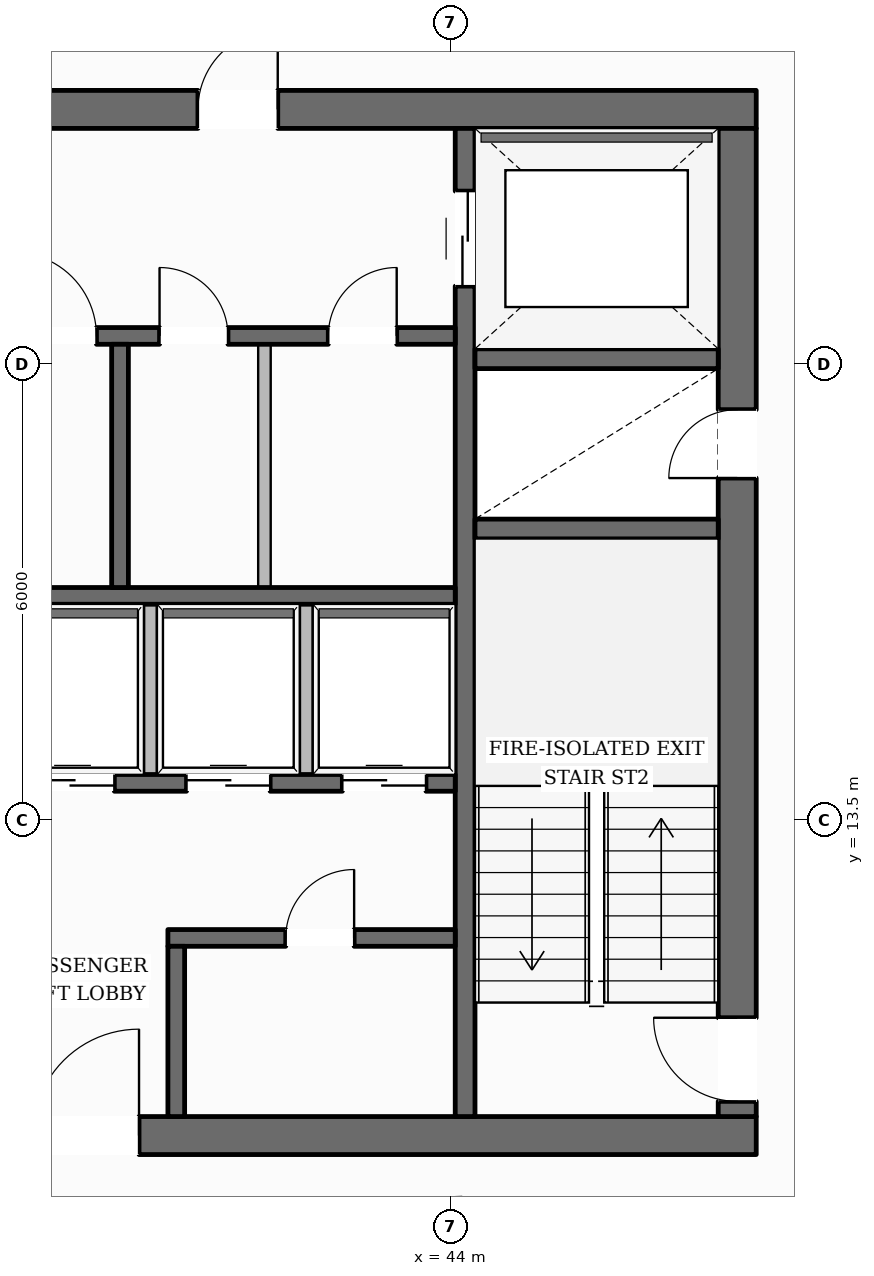
"""IFC4 building model, lengths in metres.
Left out: names, types, materials, properties, quantities, classifications, styles, units other than length and angle.
Written with IfcOpenShell. Run it as: python <this file> out.ifc"""

import sys

from ifc_helpers import new_model, si_unit, direction, frame, frame_2d, origin, place, context, subcontext, project, spatial, rectangle, extrude, element, fill, save


model = new_model("IFC4")
c1 = context("Model", 3, precision=1e-05, world=origin(), true_north=direction((0.0, 1.0)))
c2 = subcontext(c1, "Body", "Model", "MODEL_VIEW")
j1 = project(units=[si_unit("LENGTHUNIT", "METRE"), si_unit("PLANEANGLEUNIT", "RADIAN")], contexts=[c1])
p1 = place(None, origin())
s1 = spatial("IfcSite", under=j1, at=p1, CompositionType="ELEMENT")
p2 = place(p1, origin())
s2 = spatial("IfcBuilding", under=s1, at=p2, CompositionType="ELEMENT")
p3 = place(p2, frame((0.0, 0.0, 100.9)))
s3 = spatial("IfcBuildingStorey", under=s2, at=p3, CompositionType="ELEMENT", Elevation=100.9)
p4 = place(p3, frame((27.98, 9.35, 0.0), z_axis=(0.0, 0.0, 1.0), x_axis=(1.0, 0.0, 0.0)))
e1 = element("IfcWall", 1, at=p4, inside=s3, PredefinedType="SOLIDWALL", context=c2, shape_type="SweptSolid", body=[
    extrude(rectangle(XDim=20.04, YDim=0.5, at=frame_2d((10.02, 0.0))), origin(), (0.0, 0.0, 1.0), 3.6),
])
p5 = place(p4, frame((10.52, 0.0, 0.0)))
e2 = element("IfcOpeningElement", 2, at=p5, cuts=e1, PredefinedType="OPENING", context=c2, shape_type="SweptSolid", body=[
    extrude(rectangle(XDim=1.4, YDim=2.2, at=frame_2d((0.7, 1.1))), frame((0.0, 0.26, 0.0), z_axis=(0.0, -1.0, 0.0), x_axis=(1.0, 0.0, 0.0)), (0.0, 0.0, 1.0), 0.52),
])
p6 = place(p3, frame((27.98, 22.85, 0.0), z_axis=(0.0, 0.0, 1.0), x_axis=(1.0, 0.0, 0.0)))
e3 = element("IfcWall", 3, at=p6, inside=s3, PredefinedType="SOLIDWALL", context=c2, shape_type="SweptSolid", body=[
    extrude(rectangle(XDim=20.04, YDim=0.5, at=frame_2d((10.02, 0.0))), origin(), (0.0, 0.0, 1.0), 3.6),
])
p7 = place(p6, frame((6.295, 0.0, 0.0)))
e4 = element("IfcOpeningElement", 4, at=p7, cuts=e3, PredefinedType="OPENING", context=c2, shape_type="SweptSolid", body=[
    extrude(rectangle(XDim=1.05, YDim=2.15, at=frame_2d((0.525, 1.075))), frame((0.0, 0.26, 0.0), z_axis=(0.0, -1.0, 0.0), x_axis=(1.0, 0.0, 0.0)), (0.0, 0.0, 1.0), 0.52),
])
p8 = place(p6, frame((12.695, 0.0, 0.0)))
e5 = element("IfcOpeningElement", 5, at=p8, cuts=e3, PredefinedType="OPENING", context=c2, shape_type="SweptSolid", body=[
    extrude(rectangle(XDim=1.05, YDim=2.15, at=frame_2d((0.525, 1.075))), frame((0.0, 0.26, 0.0), z_axis=(0.0, -1.0, 0.0), x_axis=(1.0, 0.0, 0.0)), (0.0, 0.0, 1.0), 0.52),
])
p9 = place(p3, frame((47.77, 9.6, 0.0), z_axis=(0.0, 0.0, 1.0), x_axis=(0.0, 1.0, 0.0)))
e6 = element("IfcWall", 6, at=p9, inside=s3, PredefinedType="SOLIDWALL", context=c2, shape_type="SweptSolid", body=[
    extrude(rectangle(XDim=13.0, YDim=0.5, at=frame_2d((6.5, 0.0))), origin(), (0.0, 0.0, 1.0), 3.6),
])
p10 = place(p9, frame((0.2, 0.0, 0.0)))
e7 = element("IfcOpeningElement", 7, at=p10, cuts=e6, PredefinedType="OPENING", context=c2, shape_type="SweptSolid", body=[
    extrude(rectangle(XDim=1.1, YDim=2.15, at=frame_2d((0.55, 1.075))), frame((0.0, 0.26, 0.0), z_axis=(0.0, -1.0, 0.0), x_axis=(1.0, 0.0, 0.0)), (0.0, 0.0, 1.0), 0.52),
])
p11 = place(p9, frame((8.4, 0.0, 0.0)))
e8 = element("IfcOpeningElement", 8, at=p11, cuts=e6, PredefinedType="OPENING", context=c2, shape_type="SweptSolid", body=[
    extrude(rectangle(XDim=0.9, YDim=2.1, at=frame_2d((0.45, 1.05))), frame((0.0, 0.26, 0.0), z_axis=(0.0, -1.0, 0.0), x_axis=(1.0, 0.0, 0.0)), (0.0, 0.0, 1.0), 0.52),
])
p12 = place(p3, frame((44.19, 9.6, 0.0), z_axis=(0.0, 0.0, 1.0), x_axis=(0.0, 1.0, 0.0)))
e9 = element("IfcWall", 9, at=p12, inside=s3, PredefinedType="SHEAR", context=c2, shape_type="SweptSolid", body=[
    extrude(rectangle(XDim=13.0, YDim=0.26, at=frame_2d((6.5, 0.0))), origin(), (0.0, 0.0, 1.0), 3.6),
])
p13 = place(p12, frame((10.925, 0.0, 0.0)))
e10 = element("IfcOpeningElement", 10, at=p13, cuts=e9, PredefinedType="OPENING", context=c2, shape_type="SweptSolid", body=[
    extrude(rectangle(XDim=1.25, YDim=2.25, at=frame_2d((0.625, 1.125))), frame((0.0, 0.14, 0.0), z_axis=(0.0, -1.0, 0.0), x_axis=(1.0, 0.0, 0.0)), (0.0, 0.0, 1.0), 0.28),
])
for number, where, z_axis, x_axis in (
    (11, (44.32, 17.33, 0.0), (0.0, 0.0, 1.0), (1.0, 0.0, 0.0)),
    (12, (44.32, 19.57, 0.0), (0.0, 0.0, 1.0), (1.0, 0.0, 0.0)),
):
    element("IfcWall", number, at=place(p3, frame(where, z_axis=z_axis, x_axis=x_axis)), inside=s3, PredefinedType="SHEAR", context=c2, shape_type="SweptSolid", body=[
        extrude(rectangle(XDim=3.2, YDim=0.26, at=frame_2d((1.6, 0.0))), origin(), (0.0, 0.0, 1.0), 3.6),
    ])
p14 = place(p3, frame((31.94, 19.87, 0.0), z_axis=(0.0, 0.0, 1.0), x_axis=(1.0, 0.0, 0.0)))
e13 = element("IfcWall", 13, at=p14, inside=s3, PredefinedType="SOLIDWALL", context=c2, shape_type="SweptSolid", body=[
    extrude(rectangle(XDim=12.12, YDim=0.22, at=frame_2d((6.06, 0.0))), origin(), (0.0, 0.0, 1.0), 3.6),
])
p15 = place(p14, frame((6.3, 0.0, 0.0)))
e14 = element("IfcOpeningElement", 14, at=p15, cuts=e13, PredefinedType="OPENING", context=c2, shape_type="SweptSolid", body=[
    extrude(rectangle(XDim=1.1, YDim=2.15, at=frame_2d((0.55, 1.075))), frame((0.0, 0.12, 0.0), z_axis=(0.0, -1.0, 0.0), x_axis=(1.0, 0.0, 0.0)), (0.0, 0.0, 1.0), 0.24),
])
p16 = place(p14, frame((8.23, 0.0, 0.0)))
e15 = element("IfcOpeningElement", 15, at=p16, cuts=e13, PredefinedType="OPENING", context=c2, shape_type="SweptSolid", body=[
    extrude(rectangle(XDim=0.9, YDim=2.1, at=frame_2d((0.45, 1.05))), frame((0.0, 0.12, 0.0), z_axis=(0.0, -1.0, 0.0), x_axis=(1.0, 0.0, 0.0)), (0.0, 0.0, 1.0), 0.24),
])
p17 = place(p14, frame((10.45, 0.0, 0.0)))
e16 = element("IfcOpeningElement", 16, at=p17, cuts=e13, PredefinedType="OPENING", context=c2, shape_type="SweptSolid", body=[
    extrude(rectangle(XDim=0.9, YDim=2.1, at=frame_2d((0.45, 1.05))), frame((0.0, 0.12, 0.0), z_axis=(0.0, -1.0, 0.0), x_axis=(1.0, 0.0, 0.0)), (0.0, 0.0, 1.0), 0.24),
])
p18 = place(p3, frame((31.94, 16.45, 0.0), z_axis=(0.0, 0.0, 1.0), x_axis=(1.0, 0.0, 0.0)))
e17 = element("IfcWall", 17, at=p18, inside=s3, PredefinedType="SOLIDWALL", context=c2, shape_type="SweptSolid", body=[
    extrude(rectangle(XDim=12.12, YDim=0.22, at=frame_2d((6.06, 0.0))), origin(), (0.0, 0.0, 1.0), 3.6),
])
p19 = place(p3, frame((39.65, 16.56, 0.0), z_axis=(0.0, 0.0, 1.0), x_axis=(0.0, 1.0, 0.0)))
e18 = element("IfcWall", 18, at=p19, inside=s3, PredefinedType="SOLIDWALL", context=c2, shape_type="SweptSolid", body=[
    extrude(rectangle(XDim=3.2, YDim=0.22, at=frame_2d((1.6, 0.0))), origin(), (0.0, 0.0, 1.0), 3.6),
])
p20 = place(p3, frame((31.94, 13.99, 0.0), z_axis=(0.0, 0.0, 1.0), x_axis=(1.0, 0.0, 0.0)))
e19 = element("IfcWall", 19, at=p20, inside=s3, PredefinedType="SOLIDWALL", context=c2, shape_type="SweptSolid", body=[
    extrude(rectangle(XDim=12.12, YDim=0.22, at=frame_2d((6.06, 0.0))), origin(), (0.0, 0.0, 1.0), 3.6),
])
p21 = place(p20, frame((1.21, 0.0, 0.0)))
e20 = element("IfcOpeningElement", 20, at=p21, cuts=e19, PredefinedType="OPENING", context=c2, shape_type="SweptSolid", body=[
    extrude(rectangle(XDim=0.9, YDim=2.1, at=frame_2d((0.45, 1.05))), frame((0.0, 0.12, 0.0), z_axis=(0.0, -1.0, 0.0), x_axis=(1.0, 0.0, 0.0)), (0.0, 0.0, 1.0), 0.24),
])
p22 = place(p20, frame((4.31, 0.0, 0.0)))
e21 = element("IfcOpeningElement", 21, at=p22, cuts=e19, PredefinedType="OPENING", context=c2, shape_type="SweptSolid", body=[
    extrude(rectangle(XDim=0.9, YDim=2.1, at=frame_2d((0.45, 1.05))), frame((0.0, 0.12, 0.0), z_axis=(0.0, -1.0, 0.0), x_axis=(1.0, 0.0, 0.0)), (0.0, 0.0, 1.0), 0.24),
])
p23 = place(p20, frame((6.535, 0.0, 0.0)))
e22 = element("IfcOpeningElement", 22, at=p23, cuts=e19, PredefinedType="OPENING", context=c2, shape_type="SweptSolid", body=[
    extrude(rectangle(XDim=1.1, YDim=2.2, at=frame_2d((0.55, 1.1))), frame((0.0, 0.12, 0.0), z_axis=(0.0, -1.0, 0.0), x_axis=(1.0, 0.0, 0.0)), (0.0, 0.0, 1.0), 0.24),
])
p24 = place(p20, frame((8.585, 0.0, 0.0)))
e23 = element("IfcOpeningElement", 23, at=p24, cuts=e19, PredefinedType="OPENING", context=c2, shape_type="SweptSolid", body=[
    extrude(rectangle(XDim=1.1, YDim=2.2, at=frame_2d((0.55, 1.1))), frame((0.0, 0.12, 0.0), z_axis=(0.0, -1.0, 0.0), x_axis=(1.0, 0.0, 0.0)), (0.0, 0.0, 1.0), 0.24),
])
p25 = place(p20, frame((10.635, 0.0, 0.0)))
e24 = element("IfcOpeningElement", 24, at=p25, cuts=e19, PredefinedType="OPENING", context=c2, shape_type="SweptSolid", body=[
    extrude(rectangle(XDim=1.1, YDim=2.2, at=frame_2d((0.55, 1.1))), frame((0.0, 0.12, 0.0), z_axis=(0.0, -1.0, 0.0), x_axis=(1.0, 0.0, 0.0)), (0.0, 0.0, 1.0), 0.24),
])
p26 = place(p3, frame((40.28, 11.95, 0.0), z_axis=(0.0, 0.0, 1.0), x_axis=(1.0, 0.0, 0.0)))
e25 = element("IfcWall", 25, at=p26, inside=s3, PredefinedType="SOLIDWALL", context=c2, shape_type="SweptSolid", body=[
    extrude(rectangle(XDim=3.78, YDim=0.22, at=frame_2d((1.89, 0.0))), origin(), (0.0, 0.0, 1.0), 3.6),
])
p27 = place(p26, frame((1.55, 0.0, 0.0)))
e26 = element("IfcOpeningElement", 26, at=p27, cuts=e25, PredefinedType="OPENING", context=c2, shape_type="SweptSolid", body=[
    extrude(rectangle(XDim=0.9, YDim=2.1, at=frame_2d((0.45, 1.05))), frame((0.0, 0.12, 0.0), z_axis=(0.0, -1.0, 0.0), x_axis=(1.0, 0.0, 0.0)), (0.0, 0.0, 1.0), 0.24),
])
p28 = place(p3, frame((40.39, 9.6, 0.0), z_axis=(0.0, 0.0, 1.0), x_axis=(0.0, 1.0, 0.0)))
e27 = element("IfcWall", 27, at=p28, inside=s3, PredefinedType="SOLIDWALL", context=c2, shape_type="SweptSolid", body=[
    extrude(rectangle(XDim=2.24, YDim=0.22, at=frame_2d((1.12, 0.0))), origin(), (0.0, 0.0, 1.0), 3.6),
])
p29 = place(p3, frame((44.12, 44.689, 0.0), z_axis=(0.0, 0.0, 1.0), x_axis=(0.498376840975, -0.866960509124, 0.0)))
e28 = element("IfcWall", 28, at=p29, inside=s3, PredefinedType="STANDARD", context=c2, shape_type="SweptSolid", body=[
    extrude(rectangle(XDim=36.441, YDim=0.38, at=frame_2d((18.22, 0.0))), origin(), (0.0, 0.0, 1.0), 3.059),
])
p30 = place(p29, frame((32.234, 0.0, 0.65)))
e29 = element("IfcOpeningElement", 29, at=p30, cuts=e28, PredefinedType="OPENING", context=c2, shape_type="SweptSolid", body=[
    extrude(rectangle(XDim=1.55, YDim=1.75, at=frame_2d((0.775, 0.875))), frame((0.0, 0.2, 0.0), z_axis=(0.0, -1.0, 0.0), x_axis=(1.0, 0.0, 0.0)), (0.0, 0.0, 1.0), 0.4),
])
p31 = place(p29, frame((26.319, 0.0, 0.65)))
e30 = element("IfcOpeningElement", 30, at=p31, cuts=e28, PredefinedType="OPENING", context=c2, shape_type="SweptSolid", body=[
    extrude(rectangle(XDim=1.55, YDim=1.75, at=frame_2d((0.775, 0.875))), frame((0.0, 0.2, 0.0), z_axis=(0.0, -1.0, 0.0), x_axis=(1.0, 0.0, 0.0)), (0.0, 0.0, 1.0), 0.4),
])
p32 = place(p29, frame((14.489, 0.0, 0.65)))
e31 = element("IfcOpeningElement", 31, at=p32, cuts=e28, PredefinedType="OPENING", context=c2, shape_type="SweptSolid", body=[
    extrude(rectangle(XDim=1.55, YDim=1.75, at=frame_2d((0.775, 0.875))), frame((0.0, 0.2, 0.0), z_axis=(0.0, -1.0, 0.0), x_axis=(1.0, 0.0, 0.0)), (0.0, 0.0, 1.0), 0.4),
])
p33 = place(p29, frame((8.573, 0.0, 0.65)))
e32 = element("IfcOpeningElement", 32, at=p33, cuts=e28, PredefinedType="OPENING", context=c2, shape_type="SweptSolid", body=[
    extrude(rectangle(XDim=1.55, YDim=1.75, at=frame_2d((0.775, 0.875))), frame((0.0, 0.2, 0.0), z_axis=(0.0, -1.0, 0.0), x_axis=(1.0, 0.0, 0.0)), (0.0, 0.0, 1.0), 0.4),
])
p34 = place(p29, frame((2.658, 0.0, 0.65)))
e33 = element("IfcOpeningElement", 33, at=p34, cuts=e28, PredefinedType="OPENING", context=c2, shape_type="SweptSolid", body=[
    extrude(rectangle(XDim=1.55, YDim=1.75, at=frame_2d((0.775, 0.875))), frame((0.0, 0.2, 0.0), z_axis=(0.0, -1.0, 0.0), x_axis=(1.0, 0.0, 0.0)), (0.0, 0.0, 1.0), 0.4),
])
for number, where, z_axis, x_axis in (
    (34, (40.05, 14.1, 0.0), (0.0, 0.0, 1.0), (0.0, 1.0, 0.0)),
    (35, (42.1, 14.1, 0.0), (0.0, 0.0, 1.0), (0.0, 1.0, 0.0)),
):
    element("IfcWall", number, at=place(p3, frame(where, z_axis=z_axis, x_axis=x_axis)), inside=s3, PredefinedType="PARTITIONING", context=c2, shape_type="SweptSolid", body=[
        extrude(rectangle(XDim=2.24, YDim=0.165, at=frame_2d((1.12, 0.0))), origin(), (0.0, 0.0, 1.0), 3.6),
    ])
p35 = place(p3, frame((41.55, 16.56, 0.0), z_axis=(0.0, 0.0, 1.0), x_axis=(0.0, 1.0, 0.0)))
e36 = element("IfcWall", 36, at=p35, inside=s3, PredefinedType="PARTITIONING", context=c2, shape_type="SweptSolid", body=[
    extrude(rectangle(XDim=3.2, YDim=0.165, at=frame_2d((1.6, 0.0))), origin(), (0.0, 0.0, 1.0), 3.6),
])
p36 = place(p10, origin())
e37 = element("IfcDoor", 37, at=p36, inside=s3, OperationType="SINGLE_SWING_RIGHT", PredefinedType="DOOR", context=c2, shape_type="SweptSolid", body=[
    extrude(rectangle(XDim=1.1, YDim=2.15, at=frame_2d((0.55, 1.075))), frame((0.0, 0.025, 0.0), z_axis=(0.0, -1.0, 0.0), x_axis=(1.0, 0.0, 0.0)), (0.0, 0.0, 1.0), 0.05),
])
fill(e7, e37)
p37 = place(p15, origin())
e38 = element("IfcDoor", 38, at=p37, inside=s3, OperationType="SINGLE_SWING_LEFT", PredefinedType="DOOR", context=c2, shape_type="SweptSolid", body=[
    extrude(rectangle(XDim=1.1, YDim=2.15, at=frame_2d((0.55, 1.075))), frame((0.0, 0.025, 0.0), z_axis=(0.0, -1.0, 0.0), x_axis=(1.0, 0.0, 0.0)), (0.0, 0.0, 1.0), 0.05),
])
fill(e14, e38)
p38 = place(p11, origin())
e39 = element("IfcDoor", 39, at=p38, inside=s3, OperationType="SINGLE_SWING_LEFT", PredefinedType="DOOR", context=c2, shape_type="SweptSolid", body=[
    extrude(rectangle(XDim=0.9, YDim=2.1, at=frame_2d((0.45, 1.05))), frame((0.0, 0.025, 0.0), z_axis=(0.0, -1.0, 0.0), x_axis=(1.0, 0.0, 0.0)), (0.0, 0.0, 1.0), 0.05),
])
fill(e8, e39)
p39 = place(p8, origin())
e40 = element("IfcDoor", 40, at=p39, inside=s3, OperationType="SINGLE_SWING_RIGHT", PredefinedType="DOOR", context=c2, shape_type="SweptSolid", body=[
    extrude(rectangle(XDim=1.05, YDim=2.15, at=frame_2d((0.525, 1.075))), frame((0.0, 0.025, 0.0), z_axis=(0.0, -1.0, 0.0), x_axis=(1.0, 0.0, 0.0)), (0.0, 0.0, 1.0), 0.05),
])
fill(e5, e40)
p40 = place(p13, origin())
e41 = element("IfcDoor", 41, at=p40, inside=s3, OperationType="DOUBLE_DOOR_SLIDING", PredefinedType="DOOR", context=c2, shape_type="SweptSolid", body=[
    extrude(rectangle(XDim=1.25, YDim=2.25, at=frame_2d((0.625, 1.125))), frame((0.0, 0.025, 0.0), z_axis=(0.0, -1.0, 0.0), x_axis=(1.0, 0.0, 0.0)), (0.0, 0.0, 1.0), 0.05),
])
fill(e10, e41)
p41 = place(p5, origin())
e42 = element("IfcDoor", 42, at=p41, inside=s3, OperationType="SINGLE_SWING_RIGHT", PredefinedType="DOOR", context=c2, shape_type="SweptSolid", body=[
    extrude(rectangle(XDim=1.4, YDim=2.2, at=frame_2d((0.7, 1.1))), frame((0.0, 0.025, 0.0), z_axis=(0.0, -1.0, 0.0), x_axis=(1.0, 0.0, 0.0)), (0.0, 0.0, 1.0), 0.05),
])
fill(e2, e42)
p42 = place(p23, origin())
e43 = element("IfcDoor", 43, at=p42, inside=s3, OperationType="DOUBLE_DOOR_SLIDING", PredefinedType="DOOR", context=c2, shape_type="SweptSolid", body=[
    extrude(rectangle(XDim=1.1, YDim=2.2, at=frame_2d((0.55, 1.1))), frame((0.0, 0.025, 0.0), z_axis=(0.0, -1.0, 0.0), x_axis=(1.0, 0.0, 0.0)), (0.0, 0.0, 1.0), 0.05),
])
fill(e22, e43)
p43 = place(p24, origin())
e44 = element("IfcDoor", 44, at=p43, inside=s3, OperationType="DOUBLE_DOOR_SLIDING", PredefinedType="DOOR", context=c2, shape_type="SweptSolid", body=[
    extrude(rectangle(XDim=1.1, YDim=2.2, at=frame_2d((0.55, 1.1))), frame((0.0, 0.025, 0.0), z_axis=(0.0, -1.0, 0.0), x_axis=(1.0, 0.0, 0.0)), (0.0, 0.0, 1.0), 0.05),
])
fill(e23, e44)
p44 = place(p25, origin())
e45 = element("IfcDoor", 45, at=p44, inside=s3, OperationType="DOUBLE_DOOR_SLIDING", PredefinedType="DOOR", context=c2, shape_type="SweptSolid", body=[
    extrude(rectangle(XDim=1.1, YDim=2.2, at=frame_2d((0.55, 1.1))), frame((0.0, 0.025, 0.0), z_axis=(0.0, -1.0, 0.0), x_axis=(1.0, 0.0, 0.0)), (0.0, 0.0, 1.0), 0.05),
])
fill(e24, e45)
p45 = place(p16, origin())
e46 = element("IfcDoor", 46, at=p45, inside=s3, OperationType="SINGLE_SWING_LEFT", PredefinedType="DOOR", context=c2, shape_type="SweptSolid", body=[
    extrude(rectangle(XDim=0.9, YDim=2.1, at=frame_2d((0.45, 1.05))), frame((0.0, 0.025, 0.0), z_axis=(0.0, -1.0, 0.0), x_axis=(1.0, 0.0, 0.0)), (0.0, 0.0, 1.0), 0.05),
])
fill(e15, e46)
p46 = place(p17, origin())
e47 = element("IfcDoor", 47, at=p46, inside=s3, OperationType="SINGLE_SWING_RIGHT", PredefinedType="DOOR", context=c2, shape_type="SweptSolid", body=[
    extrude(rectangle(XDim=0.9, YDim=2.1, at=frame_2d((0.45, 1.05))), frame((0.0, 0.025, 0.0), z_axis=(0.0, -1.0, 0.0), x_axis=(1.0, 0.0, 0.0)), (0.0, 0.0, 1.0), 0.05),
])
fill(e16, e47)
p47 = place(p27, origin())
e48 = element("IfcDoor", 48, at=p47, inside=s3, OperationType="SINGLE_SWING_RIGHT", PredefinedType="DOOR", context=c2, shape_type="SweptSolid", body=[
    extrude(rectangle(XDim=0.9, YDim=2.1, at=frame_2d((0.45, 1.05))), frame((0.0, 0.025, 0.0), z_axis=(0.0, -1.0, 0.0), x_axis=(1.0, 0.0, 0.0)), (0.0, 0.0, 1.0), 0.05),
])
fill(e26, e48)
save(model, sys.argv[1])
